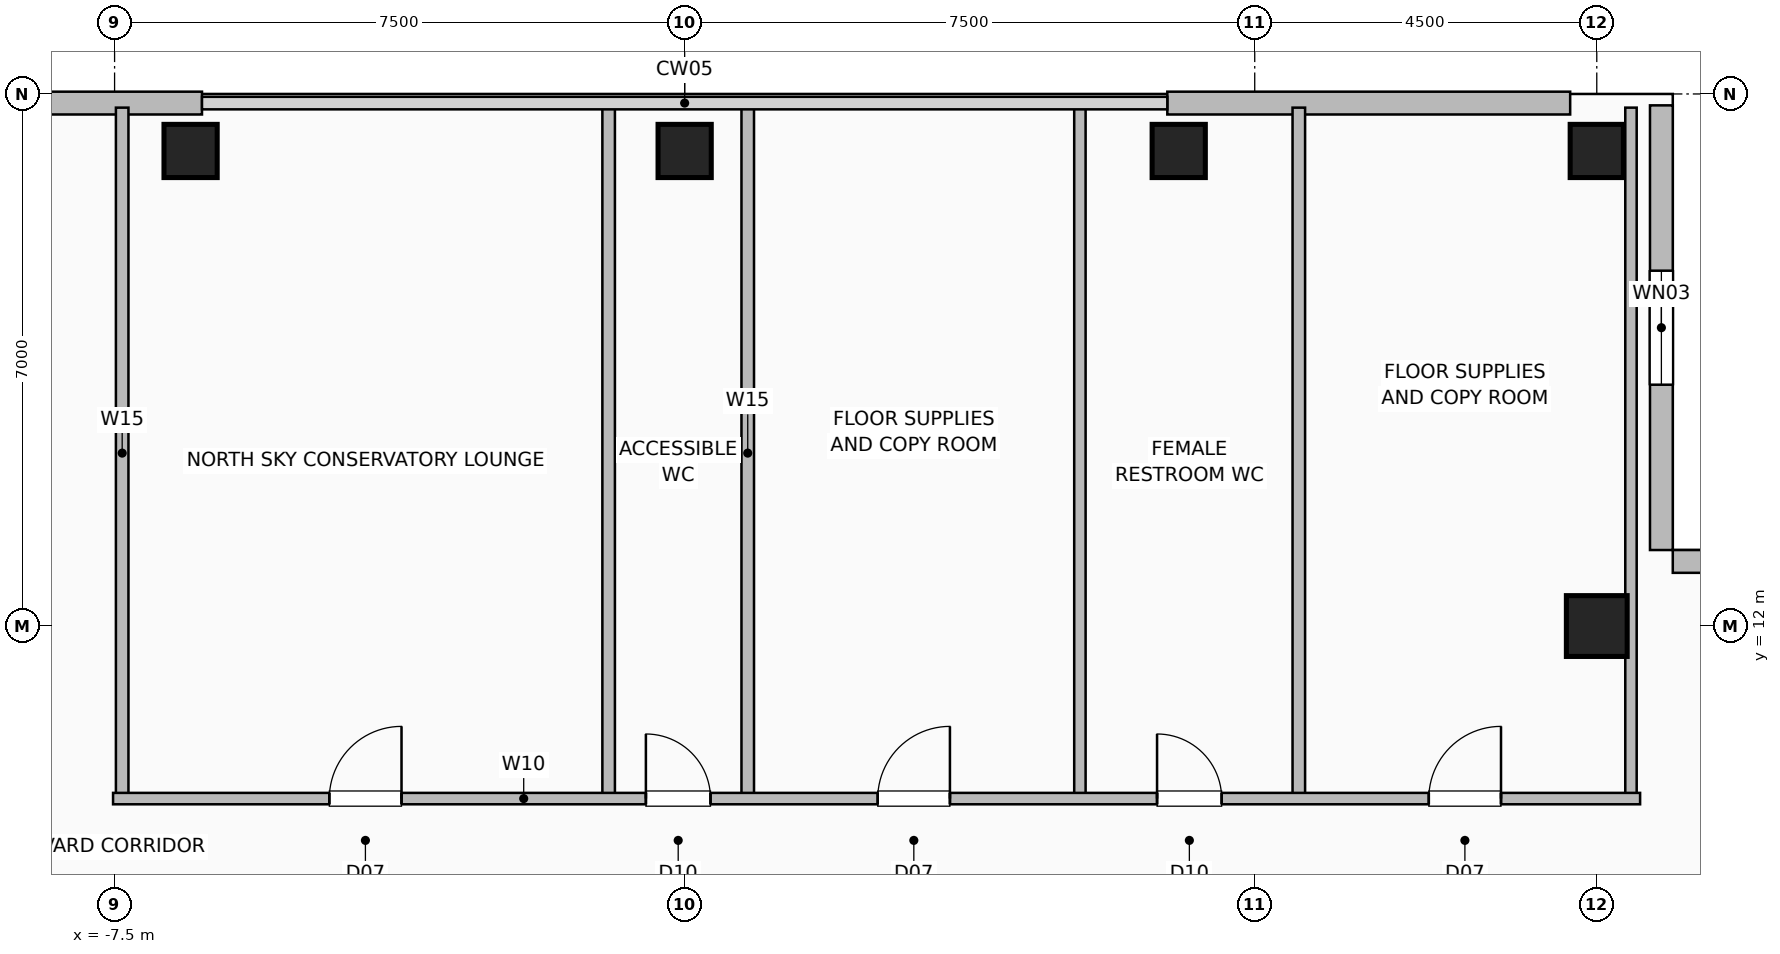
"""IFC4 building model, lengths in metres.
Left out: names, types, materials, properties, quantities, classifications, styles, units other than length and angle.
Written with IfcOpenShell. Run it as: python <this file> out.ifc"""

import sys

from ifc_helpers import new_model, si_unit, direction, frame, frame_2d, origin, origin_2d, place, context, subcontext, project, spatial, rectangle, hollow_rectangle, extrude, element, fill, save


model = new_model("IFC4")
c1 = context("Model", 3, precision=1e-05, world=origin(), true_north=direction((0.0, 1.0)))
c2 = subcontext(c1, "Body", "Model", "MODEL_VIEW")
j1 = project(units=[si_unit("LENGTHUNIT", "METRE"), si_unit("PLANEANGLEUNIT", "RADIAN")], contexts=[c1])
p1 = place(None, origin())
s1 = spatial("IfcSite", under=j1, at=p1, CompositionType="ELEMENT")
p2 = place(p1, origin())
s2 = spatial("IfcBuilding", under=s1, at=p2, CompositionType="ELEMENT")
p3 = place(p2, frame((0.0, 0.0, 268.4)))
s3 = spatial("IfcBuildingStorey", under=s2, at=p3, CompositionType="ELEMENT", Elevation=268.4)
for number, where, z_axis, x_axis in (
    (1, (-6.5, 18.25, 0.0), (0.0, 0.0, 1.0), (1.0, 0.0, 0.0)),
    (2, (0.0, 18.25, 0.0), (0.0, 0.0, 1.0), (1.0, 0.0, 0.0)),
    (3, (6.5, 18.25, 0.0), (0.0, 0.0, 1.0), (1.0, 0.0, 0.0)),
    (4, (12.0, 18.25, 0.0), (0.0, 0.0, 1.0), (1.0, 0.0, 0.0)),
):
    element("IfcColumn", number, at=place(p3, frame(where, z_axis=z_axis, x_axis=x_axis)), inside=s3, PredefinedType="COLUMN", context=c2, shape_type="SweptSolid", body=[
        extrude(hollow_rectangle(XDim=0.7, YDim=0.7, WallThickness=0.035, at=origin_2d()), origin(), (0.0, 0.0, 1.0), 3.6),
    ])
p4 = place(p3, frame((12.0, 12.0, 0.0), z_axis=(0.0, 0.0, 1.0), x_axis=(1.0, 0.0, 0.0)))
e5 = element("IfcColumn", 5, at=p4, inside=s3, PredefinedType="COLUMN", context=c2, shape_type="SweptSolid", body=[
    extrude(hollow_rectangle(XDim=0.8, YDim=0.8, WallThickness=0.04, at=origin_2d()), origin(), (0.0, 0.0, 1.0), 3.6),
])
for number, where, z_axis, x_axis in (
    (6, (-11.65, 18.88, 0.0), (0.0, 0.0, 1.0), (1.0, 0.0, 0.0)),
    (7, (6.35, 18.88, 0.0), (0.0, 0.0, 1.0), (1.0, 0.0, 0.0)),
):
    element("IfcWall", number, at=place(p3, frame(where, z_axis=z_axis, x_axis=x_axis)), inside=s3, PredefinedType="SOLIDWALL", context=c2, shape_type="SweptSolid", body=[
        extrude(rectangle(XDim=5.3, YDim=0.3, at=frame_2d((2.65, 0.0))), origin(), (0.0, 0.0, 1.0), 3.36),
    ])
p5 = place(p3, frame((12.85, 18.85, 0.0), z_axis=(0.0, 0.0, 1.0), x_axis=(0.0, -1.0, 0.0)))
e8 = element("IfcWall", 8, at=p5, inside=s3, PredefinedType="SOLIDWALL", context=c2, shape_type="SweptSolid", body=[
    extrude(rectangle(XDim=5.85, YDim=0.3, at=frame_2d((2.925, 0.0))), origin(), (0.0, 0.0, 1.0), 3.36),
])
p6 = place(p5, frame((2.175, 0.0, 0.9)))
e9 = element("IfcOpeningElement", 9, at=p6, cuts=e8, PredefinedType="OPENING", context=c2, shape_type="SweptSolid", body=[
    extrude(rectangle(XDim=1.5, YDim=1.8, at=frame_2d((0.75, 0.9))), frame((0.0, 0.16, 0.0), z_axis=(0.0, -1.0, 0.0), x_axis=(1.0, 0.0, 0.0)), (0.0, 0.0, 1.0), 0.32),
])
p7 = place(p3, frame((18.85, 12.85, 0.0), z_axis=(0.0, 0.0, 1.0), x_axis=(-1.0, 0.0, 0.0)))
e10 = element("IfcWall", 10, at=p7, inside=s3, PredefinedType="SOLIDWALL", context=c2, shape_type="SweptSolid", body=[
    extrude(rectangle(XDim=5.85, YDim=0.3, at=frame_2d((2.925, 0.0))), origin(), (0.0, 0.0, 1.0), 3.36),
])
for number, where, z_axis, x_axis in (
    (11, (0.83, 9.73, 0.0), (0.0, 0.0, 1.0), (0.0, 1.0, 0.0)),
    (12, (8.08, 9.73, 0.0), (0.0, 0.0, 1.0), (0.0, 1.0, 0.0)),
    (13, (-7.4, 9.73, 0.0), (0.0, 0.0, 1.0), (0.0, 1.0, 0.0)),
    (14, (-1.0, 9.73, 0.0), (0.0, 0.0, 1.0), (0.0, 1.0, 0.0)),
):
    element("IfcWall", number, at=place(p3, frame(where, z_axis=z_axis, x_axis=x_axis)), inside=s3, PredefinedType="PLUMBINGWALL", context=c2, shape_type="SweptSolid", body=[
        extrude(rectangle(XDim=9.09, YDim=0.165, at=frame_2d((4.545, 0.0))), origin(), (0.0, 0.0, 1.0), 3.36),
    ])
for number, where, z_axis, x_axis in (
    (15, (5.2, 9.73, 0.0), (0.0, 0.0, 1.0), (0.0, 1.0, 0.0)),
    (16, (12.45, 9.73, 0.0), (0.0, 0.0, 1.0), (0.0, 1.0, 0.0)),
):
    element("IfcWall", number, at=place(p3, frame(where, z_axis=z_axis, x_axis=x_axis)), inside=s3, PredefinedType="PARTITIONING", context=c2, shape_type="SweptSolid", body=[
        extrude(rectangle(XDim=9.09, YDim=0.15, at=frame_2d((4.545, 0.0))), origin(), (0.0, 0.0, 1.0), 3.36),
    ])
p8 = place(p3, frame((-7.52, 9.73, 0.0), z_axis=(0.0, 0.0, 1.0), x_axis=(1.0, 0.0, 0.0)))
e17 = element("IfcWall", 17, at=p8, inside=s3, PredefinedType="PARTITIONING", context=c2, shape_type="SweptSolid", body=[
    extrude(rectangle(XDim=20.09, YDim=0.15, at=frame_2d((10.045, 0.0))), origin(), (0.0, 0.0, 1.0), 3.36),
])
p9 = place(p8, frame((2.845, 0.0, 0.0)))
e18 = element("IfcOpeningElement", 18, at=p9, cuts=e17, PredefinedType="OPENING", context=c2, shape_type="SweptSolid", body=[
    extrude(rectangle(XDim=0.95, YDim=2.06, at=frame_2d((0.475, 1.03))), frame((0.0, 0.085, 0.0), z_axis=(0.0, -1.0, 0.0), x_axis=(1.0, 0.0, 0.0)), (0.0, 0.0, 1.0), 0.17),
])
p10 = place(p8, frame((7.01, 0.0, 0.0)))
e19 = element("IfcOpeningElement", 19, at=p10, cuts=e17, PredefinedType="OPENING", context=c2, shape_type="SweptSolid", body=[
    extrude(rectangle(XDim=0.85, YDim=2.05, at=frame_2d((0.425, 1.025))), frame((0.0, 0.085, 0.0), z_axis=(0.0, -1.0, 0.0), x_axis=(1.0, 0.0, 0.0)), (0.0, 0.0, 1.0), 0.17),
])
p11 = place(p8, frame((10.06, 0.0, 0.0)))
e20 = element("IfcOpeningElement", 20, at=p11, cuts=e17, PredefinedType="OPENING", context=c2, shape_type="SweptSolid", body=[
    extrude(rectangle(XDim=0.95, YDim=2.06, at=frame_2d((0.475, 1.03))), frame((0.0, 0.085, 0.0), z_axis=(0.0, -1.0, 0.0), x_axis=(1.0, 0.0, 0.0)), (0.0, 0.0, 1.0), 0.17),
])
p12 = place(p8, frame((13.735, 0.0, 0.0)))
e21 = element("IfcOpeningElement", 21, at=p12, cuts=e17, PredefinedType="OPENING", context=c2, shape_type="SweptSolid", body=[
    extrude(rectangle(XDim=0.85, YDim=2.05, at=frame_2d((0.425, 1.025))), frame((0.0, 0.085, 0.0), z_axis=(0.0, -1.0, 0.0), x_axis=(1.0, 0.0, 0.0)), (0.0, 0.0, 1.0), 0.17),
])
p13 = place(p8, frame((17.31, 0.0, 0.0)))
e22 = element("IfcOpeningElement", 22, at=p13, cuts=e17, PredefinedType="OPENING", context=c2, shape_type="SweptSolid", body=[
    extrude(rectangle(XDim=0.95, YDim=2.06, at=frame_2d((0.475, 1.03))), frame((0.0, 0.085, 0.0), z_axis=(0.0, -1.0, 0.0), x_axis=(1.0, 0.0, 0.0)), (0.0, 0.0, 1.0), 0.17),
])
p14 = place(p6, origin())
e23 = element("IfcWindow", 23, at=p14, inside=s3, PartitioningType="SINGLE_PANEL", PredefinedType="WINDOW", context=c2, shape_type="SweptSolid", body=[
    extrude(rectangle(XDim=1.5, YDim=1.8, at=frame_2d((0.75, 0.9))), frame((0.0, 0.03, 0.0), z_axis=(0.0, -1.0, 0.0), x_axis=(1.0, 0.0, 0.0)), (0.0, 0.0, 1.0), 0.06),
])
fill(e9, e23)
p15 = place(p9, origin())
e24 = element("IfcDoor", 24, at=p15, inside=s3, OperationType="SINGLE_SWING_RIGHT", PredefinedType="DOOR", context=c2, shape_type="SweptSolid", body=[
    extrude(rectangle(XDim=0.95, YDim=2.06, at=frame_2d((0.475, 1.03))), frame((0.0, 0.025, 0.0), z_axis=(0.0, -1.0, 0.0), x_axis=(1.0, 0.0, 0.0)), (0.0, 0.0, 1.0), 0.05),
])
fill(e18, e24)
p16 = place(p10, origin())
e25 = element("IfcDoor", 25, at=p16, inside=s3, OperationType="SINGLE_SWING_LEFT", PredefinedType="DOOR", context=c2, shape_type="SweptSolid", body=[
    extrude(rectangle(XDim=0.85, YDim=2.05, at=frame_2d((0.425, 1.025))), frame((0.0, 0.025, 0.0), z_axis=(0.0, -1.0, 0.0), x_axis=(1.0, 0.0, 0.0)), (0.0, 0.0, 1.0), 0.05),
])
fill(e19, e25)
p17 = place(p11, origin())
e26 = element("IfcDoor", 26, at=p17, inside=s3, OperationType="SINGLE_SWING_RIGHT", PredefinedType="DOOR", context=c2, shape_type="SweptSolid", body=[
    extrude(rectangle(XDim=0.95, YDim=2.06, at=frame_2d((0.475, 1.03))), frame((0.0, 0.025, 0.0), z_axis=(0.0, -1.0, 0.0), x_axis=(1.0, 0.0, 0.0)), (0.0, 0.0, 1.0), 0.05),
])
fill(e20, e26)
p18 = place(p12, origin())
e27 = element("IfcDoor", 27, at=p18, inside=s3, OperationType="SINGLE_SWING_LEFT", PredefinedType="DOOR", context=c2, shape_type="SweptSolid", body=[
    extrude(rectangle(XDim=0.85, YDim=2.05, at=frame_2d((0.425, 1.025))), frame((0.0, 0.025, 0.0), z_axis=(0.0, -1.0, 0.0), x_axis=(1.0, 0.0, 0.0)), (0.0, 0.0, 1.0), 0.05),
])
fill(e21, e27)
p19 = place(p13, origin())
e28 = element("IfcDoor", 28, at=p19, inside=s3, OperationType="SINGLE_SWING_RIGHT", PredefinedType="DOOR", context=c2, shape_type="SweptSolid", body=[
    extrude(rectangle(XDim=0.95, YDim=2.06, at=frame_2d((0.475, 1.03))), frame((0.0, 0.025, 0.0), z_axis=(0.0, -1.0, 0.0), x_axis=(1.0, 0.0, 0.0)), (0.0, 0.0, 1.0), 0.05),
])
fill(e22, e28)
save(model, sys.argv[1])
